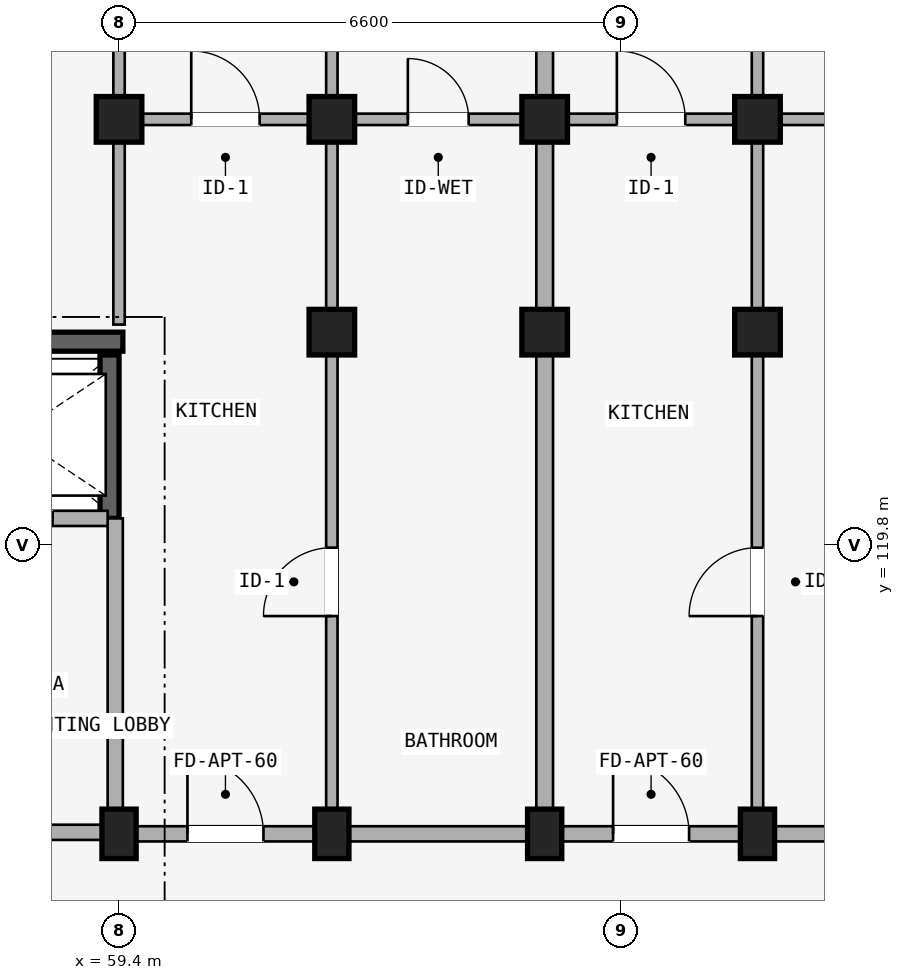
"""IFC4 building model, lengths in metres.
Left out: names, types, materials, properties, quantities, classifications, styles, units other than length and angle.
Written with IfcOpenShell. Run it as: python <this file> out.ifc"""

import sys

from ifc_helpers import new_model, si_unit, direction, frame, frame_2d, origin, origin_2d, place, context, subcontext, project, spatial, rectangle, extrude, element, fill, save


model = new_model("IFC4")
c1 = context("Model", 3, precision=1e-05, world=origin(), true_north=direction((0.0, 1.0)))
c2 = subcontext(c1, "Body", "Model", "MODEL_VIEW")
j1 = project(units=[si_unit("LENGTHUNIT", "METRE"), si_unit("PLANEANGLEUNIT", "RADIAN")], contexts=[c1])
p1 = place(None, origin())
s1 = spatial("IfcSite", under=j1, at=p1, CompositionType="ELEMENT")
p2 = place(p1, origin())
s2 = spatial("IfcBuilding", under=s1, at=p2, CompositionType="ELEMENT")
p3 = place(p2, frame((0.0, 0.0, 33.9)))
s3 = spatial("IfcBuildingStorey", under=s2, at=p3, CompositionType="ELEMENT", Elevation=33.9)
p4 = place(p3, frame((56.65, 122.475, 0.0), z_axis=(0.0, 0.0, 1.0), x_axis=(1.0, 0.0, 0.0)))
e1 = element("IfcWall", 1, at=p4, inside=s3, PredefinedType="SHEAR", context=c2, shape_type="SweptSolid", body=[
    extrude(rectangle(XDim=2.8, YDim=0.25, at=frame_2d((1.4, 0.0))), origin(), (0.0, 0.0, 1.0), 2.93),
])
p5 = place(p3, frame((59.275, 120.15, 0.0), z_axis=(0.0, 0.0, 1.0), x_axis=(0.0, 1.0, 0.0)))
e2 = element("IfcWall", 2, at=p5, inside=s3, PredefinedType="SHEAR", context=c2, shape_type="SweptSolid", body=[
    extrude(rectangle(XDim=2.15, YDim=0.25, at=frame_2d((1.075, 0.0))), origin(), (0.0, 0.0, 1.0), 2.93),
])
p6 = place(p3, frame((59.4, 116.0, 0.0), z_axis=(0.0, 0.0, 1.0), x_axis=(1.0, 0.0, 0.0)))
e3 = element("IfcColumn", 3, at=p6, inside=s3, PredefinedType="COLUMN", context=c2, shape_type="SweptSolid", body=[
    extrude(rectangle(XDim=0.45, YDim=0.65, at=origin_2d()), origin(), (0.0, 0.0, 1.0), 2.93),
])
p7 = place(p3, frame((59.4, 125.4, 0.0), z_axis=(0.0, 0.0, 1.0), x_axis=(1.0, 0.0, 0.0)))
e4 = element("IfcColumn", 4, at=p7, inside=s3, PredefinedType="COLUMN", context=c2, shape_type="SweptSolid", body=[
    extrude(rectangle(XDim=0.6, YDim=0.6, at=origin_2d()), origin(), (0.0, 0.0, 1.0), 2.93),
])
p8 = place(p3, frame((62.2, 116.0, 0.0), z_axis=(0.0, 0.0, 1.0), x_axis=(1.0, 0.0, 0.0)))
e5 = element("IfcColumn", 5, at=p8, inside=s3, PredefinedType="COLUMN", context=c2, shape_type="SweptSolid", body=[
    extrude(rectangle(XDim=0.45, YDim=0.65, at=origin_2d()), origin(), (0.0, 0.0, 1.0), 2.93),
])
for number, where, z_axis, x_axis in (
    (6, (62.2, 122.6, 0.0), (0.0, 0.0, 1.0), (1.0, 0.0, 0.0)),
    (7, (62.2, 125.4, 0.0), (0.0, 0.0, 1.0), (1.0, 0.0, 0.0)),
):
    element("IfcColumn", number, at=place(p3, frame(where, z_axis=z_axis, x_axis=x_axis)), inside=s3, PredefinedType="COLUMN", context=c2, shape_type="SweptSolid", body=[
        extrude(rectangle(XDim=0.6, YDim=0.6, at=origin_2d()), origin(), (0.0, 0.0, 1.0), 2.93),
    ])
p9 = place(p3, frame((65.0, 116.0, 0.0), z_axis=(0.0, 0.0, 1.0), x_axis=(1.0, 0.0, 0.0)))
e8 = element("IfcColumn", 8, at=p9, inside=s3, PredefinedType="COLUMN", context=c2, shape_type="SweptSolid", body=[
    extrude(rectangle(XDim=0.45, YDim=0.65, at=origin_2d()), origin(), (0.0, 0.0, 1.0), 2.93),
])
for number, where, z_axis, x_axis in (
    (9, (65.0, 122.6, 0.0), (0.0, 0.0, 1.0), (1.0, 0.0, 0.0)),
    (10, (65.0, 125.4, 0.0), (0.0, 0.0, 1.0), (1.0, 0.0, 0.0)),
):
    element("IfcColumn", number, at=place(p3, frame(where, z_axis=z_axis, x_axis=x_axis)), inside=s3, PredefinedType="COLUMN", context=c2, shape_type="SweptSolid", body=[
        extrude(rectangle(XDim=0.6, YDim=0.6, at=origin_2d()), origin(), (0.0, 0.0, 1.0), 2.93),
    ])
p10 = place(p3, frame((67.8, 116.0, 0.0), z_axis=(0.0, 0.0, 1.0), x_axis=(1.0, 0.0, 0.0)))
e11 = element("IfcColumn", 11, at=p10, inside=s3, PredefinedType="COLUMN", context=c2, shape_type="SweptSolid", body=[
    extrude(rectangle(XDim=0.45, YDim=0.65, at=origin_2d()), origin(), (0.0, 0.0, 1.0), 2.93),
])
for number, where, z_axis, x_axis in (
    (12, (67.8, 122.6, 0.0), (0.0, 0.0, 1.0), (1.0, 0.0, 0.0)),
    (13, (67.8, 125.4, 0.0), (0.0, 0.0, 1.0), (1.0, 0.0, 0.0)),
):
    element("IfcColumn", number, at=place(p3, frame(where, z_axis=z_axis, x_axis=x_axis)), inside=s3, PredefinedType="COLUMN", context=c2, shape_type="SweptSolid", body=[
        extrude(rectangle(XDim=0.6, YDim=0.6, at=origin_2d()), origin(), (0.0, 0.0, 1.0), 2.93),
    ])
p11 = place(p3, frame((53.7, 116.02, 0.0), z_axis=(0.0, 0.0, 1.0), x_axis=(1.0, 0.0, 0.0)))
e14 = element("IfcWall", 14, at=p11, inside=s3, PredefinedType="STANDARD", context=c2, shape_type="SweptSolid", body=[
    extrude(rectangle(XDim=5.65, YDim=0.2, at=frame_2d((2.825, 0.0))), origin(), (0.0, 0.0, 1.0), 2.372),
])
p12 = place(p11, frame((1.923, 0.0, 0.0)))
e15 = element("IfcOpeningElement", 15, at=p12, cuts=e14, PredefinedType="OPENING", context=c2, shape_type="SweptSolid", body=[
    extrude(rectangle(XDim=1.24, YDim=2.15, at=frame_2d((0.62, 1.075))), frame((0.0, 0.11, 0.0), z_axis=(0.0, -1.0, 0.0), x_axis=(1.0, 0.0, 0.0)), (0.0, 0.0, 1.0), 0.22),
])
p13 = place(p3, frame((59.35, 116.02, 0.0), z_axis=(0.0, 0.0, 1.0), x_axis=(0.0, 1.0, 0.0)))
e16 = element("IfcWall", 16, at=p13, inside=s3, PredefinedType="STANDARD", context=c2, shape_type="SweptSolid", body=[
    extrude(rectangle(XDim=4.13, YDim=0.2, at=frame_2d((2.065, 0.0))), origin(), (0.0, 0.0, 1.0), 2.372),
])
p14 = place(p3, frame((56.7, 120.15, 0.0), z_axis=(0.0, 0.0, 1.0), x_axis=(1.0, 0.0, 0.0)))
e17 = element("IfcWall", 17, at=p14, inside=s3, PredefinedType="STANDARD", context=c2, shape_type="SweptSolid", body=[
    extrude(rectangle(XDim=2.55, YDim=0.2, at=frame_2d((1.275, 0.0))), origin(), (0.0, 0.0, 1.0), 2.372),
])
p15 = place(p14, frame((0.725, 0.0, 0.0)))
e18 = element("IfcOpeningElement", 18, at=p15, cuts=e17, PredefinedType="OPENING", context=c2, shape_type="SweptSolid", body=[
    extrude(rectangle(XDim=1.1, YDim=2.15, at=frame_2d((0.55, 1.075))), frame((0.0, 0.11, 0.0), z_axis=(0.0, -1.0, 0.0), x_axis=(1.0, 0.0, 0.0)), (0.0, 0.0, 1.0), 0.22),
])
p16 = place(p3, frame((59.4, 116.0, 0.0), z_axis=(0.0, 0.0, 1.0), x_axis=(1.0, 0.0, 0.0)))
e19 = element("IfcWall", 19, at=p16, inside=s3, PredefinedType="STANDARD", context=c2, shape_type="SweptSolid", body=[
    extrude(rectangle(XDim=2.8, YDim=0.2, at=frame_2d((1.4, 0.0))), origin(), (0.0, 0.0, 1.0), 2.372),
])
p17 = place(p16, frame((0.9, 0.0, 0.0)))
e20 = element("IfcOpeningElement", 20, at=p17, cuts=e19, PredefinedType="OPENING", context=c2, shape_type="SweptSolid", body=[
    extrude(rectangle(XDim=1.0, YDim=2.15, at=frame_2d((0.5, 1.075))), frame((0.0, 0.11, 0.0), z_axis=(0.0, -1.0, 0.0), x_axis=(1.0, 0.0, 0.0)), (0.0, 0.0, 1.0), 0.22),
])
p18 = place(p3, frame((59.48, 125.4, 0.0), z_axis=(0.0, 0.0, 1.0), x_axis=(1.0, 0.0, 0.0)))
e21 = element("IfcWall", 21, at=p18, inside=s3, PredefinedType="PLUMBINGWALL", context=c2, shape_type="SweptSolid", body=[
    extrude(rectangle(XDim=2.64, YDim=0.15, at=frame_2d((1.32, 0.0))), origin(), (0.0, 0.0, 1.0), 2.372),
])
p19 = place(p18, frame((0.87, 0.0, 0.0)))
e22 = element("IfcOpeningElement", 22, at=p19, cuts=e21, PredefinedType="OPENING", context=c2, shape_type="SweptSolid", body=[
    extrude(rectangle(XDim=0.9, YDim=2.1, at=frame_2d((0.45, 1.05))), frame((0.0, 0.085, 0.0), z_axis=(0.0, -1.0, 0.0), x_axis=(1.0, 0.0, 0.0)), (0.0, 0.0, 1.0), 0.17),
])
p20 = place(p3, frame((62.2, 116.0, 0.0), z_axis=(0.0, 0.0, 1.0), x_axis=(1.0, 0.0, 0.0)))
e23 = element("IfcWall", 23, at=p20, inside=s3, PredefinedType="STANDARD", context=c2, shape_type="SweptSolid", body=[
    extrude(rectangle(XDim=2.8, YDim=0.2, at=frame_2d((1.4, 0.0))), origin(), (0.0, 0.0, 1.0), 2.372),
])
p21 = place(p3, frame((62.28, 125.4, 0.0), z_axis=(0.0, 0.0, 1.0), x_axis=(1.0, 0.0, 0.0)))
e24 = element("IfcWall", 24, at=p21, inside=s3, PredefinedType="PLUMBINGWALL", context=c2, shape_type="SweptSolid", body=[
    extrude(rectangle(XDim=2.64, YDim=0.15, at=frame_2d((1.32, 0.0))), origin(), (0.0, 0.0, 1.0), 2.372),
])
p22 = place(p21, frame((0.92, 0.0, 0.0)))
e25 = element("IfcOpeningElement", 25, at=p22, cuts=e24, PredefinedType="OPENING", context=c2, shape_type="SweptSolid", body=[
    extrude(rectangle(XDim=0.8, YDim=2.1, at=frame_2d((0.4, 1.05))), frame((0.0, 0.085, 0.0), z_axis=(0.0, -1.0, 0.0), x_axis=(1.0, 0.0, 0.0)), (0.0, 0.0, 1.0), 0.17),
])
p23 = place(p3, frame((65.0, 116.0, 0.0), z_axis=(0.0, 0.0, 1.0), x_axis=(1.0, 0.0, 0.0)))
e26 = element("IfcWall", 26, at=p23, inside=s3, PredefinedType="STANDARD", context=c2, shape_type="SweptSolid", body=[
    extrude(rectangle(XDim=2.8, YDim=0.2, at=frame_2d((1.4, 0.0))), origin(), (0.0, 0.0, 1.0), 2.372),
])
p24 = place(p23, frame((0.9, 0.0, 0.0)))
e27 = element("IfcOpeningElement", 27, at=p24, cuts=e26, PredefinedType="OPENING", context=c2, shape_type="SweptSolid", body=[
    extrude(rectangle(XDim=1.0, YDim=2.15, at=frame_2d((0.5, 1.075))), frame((0.0, 0.11, 0.0), z_axis=(0.0, -1.0, 0.0), x_axis=(1.0, 0.0, 0.0)), (0.0, 0.0, 1.0), 0.22),
])
p25 = place(p3, frame((65.08, 125.4, 0.0), z_axis=(0.0, 0.0, 1.0), x_axis=(1.0, 0.0, 0.0)))
e28 = element("IfcWall", 28, at=p25, inside=s3, PredefinedType="PLUMBINGWALL", context=c2, shape_type="SweptSolid", body=[
    extrude(rectangle(XDim=2.64, YDim=0.15, at=frame_2d((1.32, 0.0))), origin(), (0.0, 0.0, 1.0), 2.372),
])
p26 = place(p25, frame((0.87, 0.0, 0.0)))
e29 = element("IfcOpeningElement", 29, at=p26, cuts=e28, PredefinedType="OPENING", context=c2, shape_type="SweptSolid", body=[
    extrude(rectangle(XDim=0.9, YDim=2.1, at=frame_2d((0.45, 1.05))), frame((0.0, 0.085, 0.0), z_axis=(0.0, -1.0, 0.0), x_axis=(1.0, 0.0, 0.0)), (0.0, 0.0, 1.0), 0.17),
])
p27 = place(p3, frame((67.8, 116.0, 0.0), z_axis=(0.0, 0.0, 1.0), x_axis=(1.0, 0.0, 0.0)))
e30 = element("IfcWall", 30, at=p27, inside=s3, PredefinedType="STANDARD", context=c2, shape_type="SweptSolid", body=[
    extrude(rectangle(XDim=2.8, YDim=0.2, at=frame_2d((1.4, 0.0))), origin(), (0.0, 0.0, 1.0), 2.372),
])
p28 = place(p3, frame((67.88, 125.4, 0.0), z_axis=(0.0, 0.0, 1.0), x_axis=(1.0, 0.0, 0.0)))
e31 = element("IfcWall", 31, at=p28, inside=s3, PredefinedType="PLUMBINGWALL", context=c2, shape_type="SweptSolid", body=[
    extrude(rectangle(XDim=2.64, YDim=0.15, at=frame_2d((1.32, 0.0))), origin(), (0.0, 0.0, 1.0), 2.372),
])
p29 = place(p28, frame((0.92, 0.0, 0.0)))
e32 = element("IfcOpeningElement", 32, at=p29, cuts=e31, PredefinedType="OPENING", context=c2, shape_type="SweptSolid", body=[
    extrude(rectangle(XDim=0.8, YDim=2.1, at=frame_2d((0.4, 1.05))), frame((0.0, 0.085, 0.0), z_axis=(0.0, -1.0, 0.0), x_axis=(1.0, 0.0, 0.0)), (0.0, 0.0, 1.0), 0.17),
])
p30 = place(p3, frame((59.4, 122.7, 0.0), z_axis=(0.0, 0.0, 1.0), x_axis=(0.0, 1.0, 0.0)))
e33 = element("IfcWall", 33, at=p30, inside=s3, PredefinedType="PARTITIONING", context=c2, shape_type="SweptSolid", body=[
    extrude(rectangle(XDim=10.82, YDim=0.15, at=frame_2d((5.41, 0.0))), origin(), (0.0, 0.0, 1.0), 2.372),
])
p31 = place(p30, frame((3.7, 0.0, 0.0)))
e34 = element("IfcOpeningElement", 34, at=p31, cuts=e33, PredefinedType="OPENING", context=c2, shape_type="SweptSolid", body=[
    extrude(rectangle(XDim=0.8, YDim=2.1, at=frame_2d((0.4, 1.05))), frame((0.0, 0.085, 0.0), z_axis=(0.0, -1.0, 0.0), x_axis=(1.0, 0.0, 0.0)), (0.0, 0.0, 1.0), 0.17),
])
p32 = place(p3, frame((62.2, 116.05, 0.0), z_axis=(0.0, 0.0, 1.0), x_axis=(0.0, 1.0, 0.0)))
e35 = element("IfcWall", 35, at=p32, inside=s3, PredefinedType="PARTITIONING", context=c2, shape_type="SweptSolid", body=[
    extrude(rectangle(XDim=6.53, YDim=0.15, at=frame_2d((3.265, 0.0))), origin(), (0.0, 0.0, 1.0), 2.372),
])
p33 = place(p32, frame((2.815, 0.0, 0.0)))
e36 = element("IfcOpeningElement", 36, at=p33, cuts=e35, PredefinedType="OPENING", context=c2, shape_type="SweptSolid", body=[
    extrude(rectangle(XDim=0.9, YDim=2.1, at=frame_2d((0.45, 1.05))), frame((0.0, 0.085, 0.0), z_axis=(0.0, -1.0, 0.0), x_axis=(1.0, 0.0, 0.0)), (0.0, 0.0, 1.0), 0.17),
])
p34 = place(p3, frame((62.2, 122.7, 0.0), z_axis=(0.0, 0.0, 1.0), x_axis=(0.0, 1.0, 0.0)))
e37 = element("IfcWall", 37, at=p34, inside=s3, PredefinedType="PARTITIONING", context=c2, shape_type="SweptSolid", body=[
    extrude(rectangle(XDim=10.82, YDim=0.15, at=frame_2d((5.41, 0.0))), origin(), (0.0, 0.0, 1.0), 2.372),
])
p35 = place(p34, frame((3.7, 0.0, 0.0)))
e38 = element("IfcOpeningElement", 38, at=p35, cuts=e37, PredefinedType="OPENING", context=c2, shape_type="SweptSolid", body=[
    extrude(rectangle(XDim=0.8, YDim=2.1, at=frame_2d((0.4, 1.05))), frame((0.0, 0.085, 0.0), z_axis=(0.0, -1.0, 0.0), x_axis=(1.0, 0.0, 0.0)), (0.0, 0.0, 1.0), 0.17),
])
p36 = place(p3, frame((65.0, 116.05, 0.0), z_axis=(0.0, 0.0, 1.0), x_axis=(0.0, 1.0, 0.0)))
e39 = element("IfcWall", 39, at=p36, inside=s3, PredefinedType="STANDARD", context=c2, shape_type="SweptSolid", body=[
    extrude(rectangle(XDim=6.53, YDim=0.22, at=frame_2d((3.265, 0.0))), origin(), (0.0, 0.0, 1.0), 2.372),
])
p37 = place(p3, frame((65.0, 122.7, 0.0), z_axis=(0.0, 0.0, 1.0), x_axis=(0.0, 1.0, 0.0)))
e40 = element("IfcWall", 40, at=p37, inside=s3, PredefinedType="STANDARD", context=c2, shape_type="SweptSolid", body=[
    extrude(rectangle(XDim=10.82, YDim=0.22, at=frame_2d((5.41, 0.0))), origin(), (0.0, 0.0, 1.0), 2.372),
])
p38 = place(p3, frame((67.8, 116.05, 0.0), z_axis=(0.0, 0.0, 1.0), x_axis=(0.0, 1.0, 0.0)))
e41 = element("IfcWall", 41, at=p38, inside=s3, PredefinedType="PARTITIONING", context=c2, shape_type="SweptSolid", body=[
    extrude(rectangle(XDim=6.53, YDim=0.15, at=frame_2d((3.265, 0.0))), origin(), (0.0, 0.0, 1.0), 2.372),
])
p39 = place(p38, frame((2.815, 0.0, 0.0)))
e42 = element("IfcOpeningElement", 42, at=p39, cuts=e41, PredefinedType="OPENING", context=c2, shape_type="SweptSolid", body=[
    extrude(rectangle(XDim=0.9, YDim=2.1, at=frame_2d((0.45, 1.05))), frame((0.0, 0.085, 0.0), z_axis=(0.0, -1.0, 0.0), x_axis=(1.0, 0.0, 0.0)), (0.0, 0.0, 1.0), 0.17),
])
p40 = place(p3, frame((67.8, 122.7, 0.0), z_axis=(0.0, 0.0, 1.0), x_axis=(0.0, 1.0, 0.0)))
e43 = element("IfcWall", 43, at=p40, inside=s3, PredefinedType="PARTITIONING", context=c2, shape_type="SweptSolid", body=[
    extrude(rectangle(XDim=10.82, YDim=0.15, at=frame_2d((5.41, 0.0))), origin(), (0.0, 0.0, 1.0), 2.372),
])
p41 = place(p40, frame((3.7, 0.0, 0.0)))
e44 = element("IfcOpeningElement", 44, at=p41, cuts=e43, PredefinedType="OPENING", context=c2, shape_type="SweptSolid", body=[
    extrude(rectangle(XDim=0.8, YDim=2.1, at=frame_2d((0.4, 1.05))), frame((0.0, 0.085, 0.0), z_axis=(0.0, -1.0, 0.0), x_axis=(1.0, 0.0, 0.0)), (0.0, 0.0, 1.0), 0.17),
])
p42 = place(p15, origin())
e45 = element("IfcDoor", 45, at=p42, inside=s3, OperationType="SLIDING_TO_LEFT", PredefinedType="DOOR", context=c2, shape_type="SweptSolid", body=[
    extrude(rectangle(XDim=1.1, YDim=2.15, at=frame_2d((0.55, 1.075))), frame((0.0, 0.025, 0.0), z_axis=(0.0, -1.0, 0.0), x_axis=(1.0, 0.0, 0.0)), (0.0, 0.0, 1.0), 0.05),
])
fill(e18, e45)
p43 = place(p19, origin())
e46 = element("IfcDoor", 46, at=p43, inside=s3, OperationType="SINGLE_SWING_LEFT", PredefinedType="DOOR", context=c2, shape_type="SweptSolid", body=[
    extrude(rectangle(XDim=0.9, YDim=2.1, at=frame_2d((0.45, 1.05))), frame((0.0, 0.025, 0.0), z_axis=(0.0, -1.0, 0.0), x_axis=(1.0, 0.0, 0.0)), (0.0, 0.0, 1.0), 0.05),
])
fill(e22, e46)
p44 = place(p17, frame((1.0, 0.0, 0.0), z_axis=(0.0, 0.0, 1.0), x_axis=(-1.0, 0.0, 0.0)))
e47 = element("IfcDoor", 47, at=p44, inside=s3, OperationType="SINGLE_SWING_RIGHT", PredefinedType="DOOR", context=c2, shape_type="SweptSolid", body=[
    extrude(rectangle(XDim=1.0, YDim=2.15, at=frame_2d((0.5, 1.075))), frame((0.0, 0.025, 0.0), z_axis=(0.0, -1.0, 0.0), x_axis=(1.0, 0.0, 0.0)), (0.0, 0.0, 1.0), 0.05),
])
fill(e20, e47)
p45 = place(p22, origin())
e48 = element("IfcDoor", 48, at=p45, inside=s3, OperationType="SINGLE_SWING_LEFT", PredefinedType="DOOR", context=c2, shape_type="SweptSolid", body=[
    extrude(rectangle(XDim=0.8, YDim=2.1, at=frame_2d((0.4, 1.05))), frame((0.0, 0.025, 0.0), z_axis=(0.0, -1.0, 0.0), x_axis=(1.0, 0.0, 0.0)), (0.0, 0.0, 1.0), 0.05),
])
fill(e25, e48)
p46 = place(p26, origin())
e49 = element("IfcDoor", 49, at=p46, inside=s3, OperationType="SINGLE_SWING_LEFT", PredefinedType="DOOR", context=c2, shape_type="SweptSolid", body=[
    extrude(rectangle(XDim=0.9, YDim=2.1, at=frame_2d((0.45, 1.05))), frame((0.0, 0.025, 0.0), z_axis=(0.0, -1.0, 0.0), x_axis=(1.0, 0.0, 0.0)), (0.0, 0.0, 1.0), 0.05),
])
fill(e29, e49)
p47 = place(p24, frame((1.0, 0.0, 0.0), z_axis=(0.0, 0.0, 1.0), x_axis=(-1.0, 0.0, 0.0)))
e50 = element("IfcDoor", 50, at=p47, inside=s3, OperationType="SINGLE_SWING_RIGHT", PredefinedType="DOOR", context=c2, shape_type="SweptSolid", body=[
    extrude(rectangle(XDim=1.0, YDim=2.15, at=frame_2d((0.5, 1.075))), frame((0.0, 0.025, 0.0), z_axis=(0.0, -1.0, 0.0), x_axis=(1.0, 0.0, 0.0)), (0.0, 0.0, 1.0), 0.05),
])
fill(e27, e50)
p48 = place(p33, frame((0.9, 0.0, 0.0), z_axis=(0.0, 0.0, 1.0), x_axis=(-1.0, 0.0, 0.0)))
e51 = element("IfcDoor", 51, at=p48, inside=s3, OperationType="SINGLE_SWING_RIGHT", PredefinedType="DOOR", context=c2, shape_type="SweptSolid", body=[
    extrude(rectangle(XDim=0.9, YDim=2.1, at=frame_2d((0.45, 1.05))), frame((0.0, 0.025, 0.0), z_axis=(0.0, -1.0, 0.0), x_axis=(1.0, 0.0, 0.0)), (0.0, 0.0, 1.0), 0.05),
])
fill(e36, e51)
p49 = place(p39, origin())
e52 = element("IfcDoor", 52, at=p49, inside=s3, OperationType="SINGLE_SWING_LEFT", PredefinedType="DOOR", context=c2, shape_type="SweptSolid", body=[
    extrude(rectangle(XDim=0.9, YDim=2.1, at=frame_2d((0.45, 1.05))), frame((0.0, 0.025, 0.0), z_axis=(0.0, -1.0, 0.0), x_axis=(1.0, 0.0, 0.0)), (0.0, 0.0, 1.0), 0.05),
])
fill(e42, e52)
save(model, sys.argv[1])
